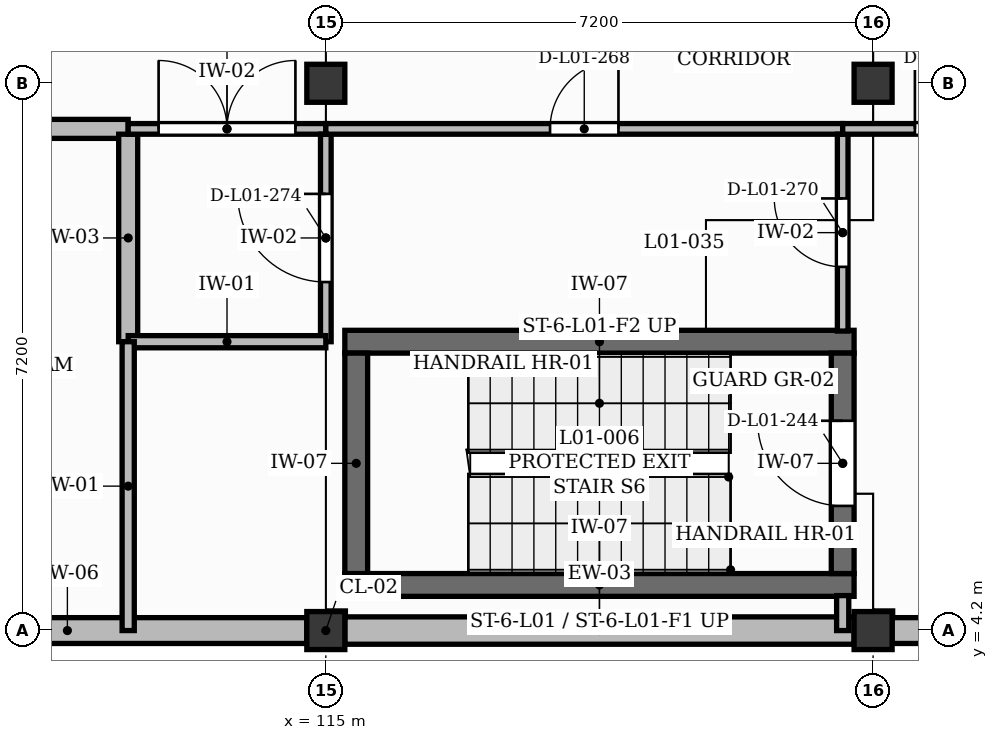
"""IFC4 building model, lengths in metres.
Left out: names, types, materials, properties, quantities, classifications, styles, units other than length and angle.
Written with IfcOpenShell. Run it as: python <this file> out.ifc"""

import sys

from ifc_helpers import new_model, si_unit, direction, frame, frame_2d, origin, origin_2d, place, context, subcontext, project, spatial, rectangle, extrude, element, fill, save


model = new_model("IFC4")
c1 = context("Model", 3, precision=1e-05, world=origin(), true_north=direction((0.0, 1.0)))
c2 = subcontext(c1, "Body", "Model", "MODEL_VIEW")
j1 = project(units=[si_unit("LENGTHUNIT", "METRE"), si_unit("PLANEANGLEUNIT", "RADIAN")], contexts=[c1])
p1 = place(None, origin())
s1 = spatial("IfcSite", under=j1, at=p1, CompositionType="ELEMENT")
p2 = place(p1, origin())
s2 = spatial("IfcBuilding", under=s1, at=p2, CompositionType="ELEMENT")
p3 = place(p2, frame((0.0, 0.0, 4.5)))
s3 = spatial("IfcBuildingStorey", under=s2, at=p3, CompositionType="ELEMENT", Elevation=4.5)
for number, where, z_axis, x_axis in (
    (1, (115.0, 4.2, 0.0), (0.0, 0.0, 1.0), (1.0, 0.0, 0.0)),
    (2, (115.0, 11.4, 0.0), (0.0, 0.0, 1.0), (1.0, 0.0, 0.0)),
    (3, (122.2, 4.2, 0.0), (0.0, 0.0, 1.0), (1.0, 0.0, 0.0)),
    (4, (122.2, 11.4, 0.0), (0.0, 0.0, 1.0), (1.0, 0.0, 0.0)),
):
    element("IfcColumn", number, at=place(p3, frame(where, z_axis=z_axis, x_axis=x_axis)), inside=s3, PredefinedType="COLUMN", context=c2, shape_type="SweptSolid", body=[
        extrude(rectangle(XDim=0.5, YDim=0.5, at=origin_2d()), origin(), (0.0, 0.0, 1.0), 4.22),
    ])
p4 = place(p3, frame((107.96, 4.2, 0.0), z_axis=(0.0, 0.0, 1.0), x_axis=(1.0, 0.0, 0.0)))
e5 = element("IfcWall", 5, at=p4, inside=s3, PredefinedType="SOLIDWALL", context=c2, shape_type="SweptSolid", body=[
    extrude(rectangle(XDim=6.79, YDim=0.34, at=frame_2d((3.395, 0.0))), origin(), (0.0, 0.0, 1.0), 3.76),
])
p5 = place(p4, frame((1.42, 0.0, 1.0)))
e6 = element("IfcOpeningElement", 6, at=p5, cuts=e5, PredefinedType="OPENING", context=c2, shape_type="SweptSolid", body=[
    extrude(rectangle(XDim=1.72, YDim=2.2, at=frame_2d((0.86, 1.1))), frame((0.0, 0.18, 0.0), z_axis=(0.0, -1.0, 0.0), x_axis=(1.0, 0.0, 0.0)), (0.0, 0.0, 1.0), 0.36),
])
p6 = place(p3, frame((115.25, 4.2, 0.0), z_axis=(0.0, 0.0, 1.0), x_axis=(1.0, 0.0, 0.0)))
e7 = element("IfcWall", 7, at=p6, inside=s3, PredefinedType="SOLIDWALL", context=c2, shape_type="SweptSolid", body=[
    extrude(rectangle(XDim=6.7, YDim=0.36, at=frame_2d((3.35, 0.0))), origin(), (0.0, 0.0, 1.0), 3.52),
])
p7 = place(p3, frame((122.45, 4.2, 0.0), z_axis=(0.0, 0.0, 1.0), x_axis=(1.0, 0.0, 0.0)))
e8 = element("IfcWall", 8, at=p7, inside=s3, PredefinedType="SOLIDWALL", context=c2, shape_type="SweptSolid", body=[
    extrude(rectangle(XDim=5.9, YDim=0.34, at=frame_2d((2.95, 0.0))), origin(), (0.0, 0.0, 1.0), 3.52),
])
p8 = place(p7, frame((3.39, 0.0, 1.5)))
e9 = element("IfcOpeningElement", 9, at=p8, cuts=e8, PredefinedType="OPENING", context=c2, shape_type="SweptSolid", body=[
    extrude(rectangle(XDim=1.15, YDim=1.25, at=frame_2d((0.575, 0.625))), frame((0.0, 0.18, 0.0), z_axis=(0.0, -1.0, 0.0), x_axis=(1.0, 0.0, 0.0)), (0.0, 0.0, 1.0), 0.36),
])
for number, where, z_axis, x_axis in (
    (10, (115.25, 4.8, 0.0), (0.0, 0.0, 1.0), (1.0, 0.0, 0.0)),
    (11, (115.25, 8.0, 0.0), (0.0, 0.0, 1.0), (1.0, 0.0, 0.0)),
):
    element("IfcWall", number, at=place(p3, frame(where, z_axis=z_axis, x_axis=x_axis)), inside=s3, PredefinedType="SHEAR", context=c2, shape_type="SweptSolid", body=[
        extrude(rectangle(XDim=6.7, YDim=0.3, at=frame_2d((3.35, 0.0))), origin(), (0.0, 0.0, 1.0), 4.25),
    ])
p9 = place(p3, frame((115.4, 4.95, 0.0), z_axis=(0.0, 0.0, 1.0), x_axis=(0.0, 1.0, 0.0)))
e12 = element("IfcWall", 12, at=p9, inside=s3, PredefinedType="SHEAR", context=c2, shape_type="SweptSolid", body=[
    extrude(rectangle(XDim=2.9, YDim=0.3, at=frame_2d((1.45, 0.0))), origin(), (0.0, 0.0, 1.0), 4.25),
])
p10 = place(p3, frame((121.8, 4.95, 0.0), z_axis=(0.0, 0.0, 1.0), x_axis=(0.0, 1.0, 0.0)))
e13 = element("IfcWall", 13, at=p10, inside=s3, PredefinedType="SHEAR", context=c2, shape_type="SweptSolid", body=[
    extrude(rectangle(XDim=2.9, YDim=0.3, at=frame_2d((1.45, 0.0))), origin(), (0.0, 0.0, 1.0), 4.25),
])
p11 = place(p10, frame((0.89, 0.0, 0.0)))
e14 = element("IfcOpeningElement", 14, at=p11, cuts=e13, PredefinedType="OPENING", context=c2, shape_type="SweptSolid", body=[
    extrude(rectangle(XDim=1.12, YDim=2.1, at=frame_2d((0.56, 1.05))), frame((0.0, 0.16, 0.0), z_axis=(0.0, -1.0, 0.0), x_axis=(1.0, 0.0, 0.0)), (0.0, 0.0, 1.0), 0.32),
])
p12 = place(p3, frame((107.8, 10.8, 0.0), z_axis=(0.0, 0.0, 1.0), x_axis=(1.0, 0.0, 0.0)))
e15 = element("IfcWall", 15, at=p12, inside=s3, PredefinedType="SOLIDWALL", context=c2, shape_type="SweptSolid", body=[
    extrude(rectangle(XDim=4.6, YDim=0.25, at=frame_2d((2.3, 0.0))), origin(), (0.0, 0.0, 1.0), 4.18),
])
p13 = place(p12, frame((1.46, 0.0, 0.0)))
e16 = element("IfcOpeningElement", 16, at=p13, cuts=e15, PredefinedType="OPENING", context=c2, shape_type="SweptSolid", body=[
    extrude(rectangle(XDim=1.68, YDim=2.3, at=frame_2d((0.84, 1.15))), frame((0.0, 0.135, 0.0), z_axis=(0.0, -1.0, 0.0), x_axis=(1.0, 0.0, 0.0)), (0.0, 0.0, 1.0), 0.27),
])
p14 = place(p3, frame((112.4, 8.0, 0.0), z_axis=(0.0, 0.0, 1.0), x_axis=(0.0, 1.0, 0.0)))
e17 = element("IfcWall", 17, at=p14, inside=s3, PredefinedType="SOLIDWALL", context=c2, shape_type="SweptSolid", body=[
    extrude(rectangle(XDim=2.73, YDim=0.25, at=frame_2d((1.365, 0.0))), origin(), (0.0, 0.0, 1.0), 4.18),
])
p15 = place(p3, frame((112.4, 10.8, 0.0), z_axis=(0.0, 0.0, 1.0), x_axis=(1.0, 0.0, 0.0)))
e18 = element("IfcWall", 18, at=p15, inside=s3, PredefinedType="PARTITIONING", context=c2, shape_type="SweptSolid", body=[
    extrude(rectangle(XDim=2.6, YDim=0.14, at=frame_2d((1.3, 0.0))), origin(), (0.0, 0.0, 1.0), 4.18),
])
p16 = place(p15, frame((0.4, 0.0, 0.0)))
e19 = element("IfcOpeningElement", 19, at=p16, cuts=e18, PredefinedType="OPENING", context=c2, shape_type="SweptSolid", body=[
    extrude(rectangle(XDim=1.8, YDim=2.3, at=frame_2d((0.9, 1.15))), frame((0.0, 0.08, 0.0), z_axis=(0.0, -1.0, 0.0), x_axis=(1.0, 0.0, 0.0)), (0.0, 0.0, 1.0), 0.16),
])
p17 = place(p3, frame((115.0, 8.0, 0.0), z_axis=(0.0, 0.0, 1.0), x_axis=(0.0, 1.0, 0.0)))
e20 = element("IfcWall", 20, at=p17, inside=s3, PredefinedType="PARTITIONING", context=c2, shape_type="SweptSolid", body=[
    extrude(rectangle(XDim=2.73, YDim=0.14, at=frame_2d((1.365, 0.0))), origin(), (0.0, 0.0, 1.0), 3.52),
])
p18 = place(p17, frame((0.785, 0.0, 0.0)))
e21 = element("IfcOpeningElement", 21, at=p18, cuts=e20, PredefinedType="OPENING", context=c2, shape_type="SweptSolid", body=[
    extrude(rectangle(XDim=1.16, YDim=2.1, at=frame_2d((0.58, 1.05))), frame((0.0, 0.08, 0.0), z_axis=(0.0, -1.0, 0.0), x_axis=(1.0, 0.0, 0.0)), (0.0, 0.0, 1.0), 0.16),
])
p19 = place(p3, frame((115.0, 10.8, 0.0), z_axis=(0.0, 0.0, 1.0), x_axis=(1.0, 0.0, 0.0)))
e22 = element("IfcWall", 22, at=p19, inside=s3, PredefinedType="PARTITIONING", context=c2, shape_type="SweptSolid", body=[
    extrude(rectangle(XDim=6.8, YDim=0.14, at=frame_2d((3.4, 0.0))), origin(), (0.0, 0.0, 1.0), 4.18),
])
p20 = place(p19, frame((2.95, 0.0, 0.0)))
e23 = element("IfcOpeningElement", 23, at=p20, cuts=e22, PredefinedType="OPENING", context=c2, shape_type="SweptSolid", body=[
    extrude(rectangle(XDim=0.9, YDim=2.1, at=frame_2d((0.45, 1.05))), frame((0.0, 0.08, 0.0), z_axis=(0.0, -1.0, 0.0), x_axis=(1.0, 0.0, 0.0)), (0.0, 0.0, 1.0), 0.16),
])
p21 = place(p3, frame((121.8, 8.14, 0.0), z_axis=(0.0, 0.0, 1.0), x_axis=(0.0, 1.0, 0.0)))
e24 = element("IfcWall", 24, at=p21, inside=s3, PredefinedType="PARTITIONING", context=c2, shape_type="SweptSolid", body=[
    extrude(rectangle(XDim=2.59, YDim=0.14, at=frame_2d((1.295, 0.0))), origin(), (0.0, 0.0, 1.0), 4.18),
])
p22 = place(p21, frame((0.845, 0.0, 0.0)))
e25 = element("IfcOpeningElement", 25, at=p22, cuts=e24, PredefinedType="OPENING", context=c2, shape_type="SweptSolid", body=[
    extrude(rectangle(XDim=0.9, YDim=2.1, at=frame_2d((0.45, 1.05))), frame((0.0, 0.08, 0.0), z_axis=(0.0, -1.0, 0.0), x_axis=(1.0, 0.0, 0.0)), (0.0, 0.0, 1.0), 0.16),
])
p23 = place(p3, frame((121.8, 10.8, 0.0), z_axis=(0.0, 0.0, 1.0), x_axis=(1.0, 0.0, 0.0)))
e26 = element("IfcWall", 26, at=p23, inside=s3, PredefinedType="PARTITIONING", context=c2, shape_type="SweptSolid", body=[
    extrude(rectangle(XDim=2.8, YDim=0.14, at=frame_2d((1.4, 0.0))), origin(), (0.0, 0.0, 1.0), 4.18),
])
p24 = place(p23, frame((0.95, 0.0, 0.0)))
e27 = element("IfcOpeningElement", 27, at=p24, cuts=e26, PredefinedType="OPENING", context=c2, shape_type="SweptSolid", body=[
    extrude(rectangle(XDim=0.9, YDim=2.1, at=frame_2d((0.45, 1.05))), frame((0.0, 0.08, 0.0), z_axis=(0.0, -1.0, 0.0), x_axis=(1.0, 0.0, 0.0)), (0.0, 0.0, 1.0), 0.16),
])
p25 = place(p3, frame((121.8, 4.2, 0.0), z_axis=(0.0, 0.0, 1.0), x_axis=(0.0, 1.0, 0.0)))
e28 = element("IfcWall", 28, at=p25, inside=s3, PredefinedType="PARTITIONING", context=c2, shape_type="SweptSolid", body=[
    extrude(rectangle(XDim=0.46, YDim=0.16, at=frame_2d((0.23, 0.0))), origin(), (0.0, 0.0, 1.0), 4.18),
])
p26 = place(p3, frame((112.4, 8.0, 0.0), z_axis=(0.0, 0.0, 1.0), x_axis=(1.0, 0.0, 0.0)))
e29 = element("IfcWall", 29, at=p26, inside=s3, PredefinedType="PARTITIONING", context=c2, shape_type="SweptSolid", body=[
    extrude(rectangle(XDim=2.6, YDim=0.16, at=frame_2d((1.3, 0.0))), origin(), (0.0, 0.0, 1.0), 4.18),
])
p27 = place(p3, frame((112.4, 4.2, 0.0), z_axis=(0.0, 0.0, 1.0), x_axis=(0.0, 1.0, 0.0)))
e30 = element("IfcWall", 30, at=p27, inside=s3, PredefinedType="PARTITIONING", context=c2, shape_type="SweptSolid", body=[
    extrude(rectangle(XDim=3.8, YDim=0.16, at=frame_2d((1.9, 0.0))), origin(), (0.0, 0.0, 1.0), 4.18),
])
p28 = place(p11, origin())
e31 = element("IfcDoor", 31, at=p28, inside=s3, OperationType="SINGLE_SWING_RIGHT", PredefinedType="DOOR", context=c2, shape_type="SweptSolid", body=[
    extrude(rectangle(XDim=1.12, YDim=2.1, at=frame_2d((0.56, 1.05))), frame((0.0, 0.025, 0.0), z_axis=(0.0, -1.0, 0.0), x_axis=(1.0, 0.0, 0.0)), (0.0, 0.0, 1.0), 0.05),
])
fill(e14, e31)
p29 = place(p24, origin())
e32 = element("IfcDoor", 32, at=p29, inside=s3, OperationType="SINGLE_SWING_LEFT", PredefinedType="DOOR", context=c2, shape_type="SweptSolid", body=[
    extrude(rectangle(XDim=0.9, YDim=2.1, at=frame_2d((0.45, 1.05))), frame((0.0, 0.025, 0.0), z_axis=(0.0, -1.0, 0.0), x_axis=(1.0, 0.0, 0.0)), (0.0, 0.0, 1.0), 0.05),
])
fill(e27, e32)
p30 = place(p16, origin())
e33 = element("IfcDoor", 33, at=p30, inside=s3, OperationType="DOUBLE_DOOR_SINGLE_SWING", PredefinedType="DOOR", context=c2, shape_type="SweptSolid", body=[
    extrude(rectangle(XDim=1.8, YDim=2.3, at=frame_2d((0.9, 1.15))), frame((0.0, 0.025, 0.0), z_axis=(0.0, -1.0, 0.0), x_axis=(1.0, 0.0, 0.0)), (0.0, 0.0, 1.0), 0.05),
])
fill(e19, e33)
p31 = place(p20, origin())
e34 = element("IfcDoor", 34, at=p31, inside=s3, OperationType="SINGLE_SWING_RIGHT", PredefinedType="DOOR", context=c2, shape_type="SweptSolid", body=[
    extrude(rectangle(XDim=0.9, YDim=2.1, at=frame_2d((0.45, 1.05))), frame((0.0, 0.025, 0.0), z_axis=(0.0, -1.0, 0.0), x_axis=(1.0, 0.0, 0.0)), (0.0, 0.0, 1.0), 0.05),
])
fill(e23, e34)
p32 = place(p22, origin())
e35 = element("IfcDoor", 35, at=p32, inside=s3, OperationType="SINGLE_SWING_RIGHT", PredefinedType="DOOR", context=c2, shape_type="SweptSolid", body=[
    extrude(rectangle(XDim=0.9, YDim=2.1, at=frame_2d((0.45, 1.05))), frame((0.0, 0.025, 0.0), z_axis=(0.0, -1.0, 0.0), x_axis=(1.0, 0.0, 0.0)), (0.0, 0.0, 1.0), 0.05),
])
fill(e25, e35)
p33 = place(p18, origin())
e36 = element("IfcDoor", 36, at=p33, inside=s3, OperationType="SINGLE_SWING_RIGHT", PredefinedType="DOOR", context=c2, shape_type="SweptSolid", body=[
    extrude(rectangle(XDim=1.16, YDim=2.1, at=frame_2d((0.58, 1.05))), frame((0.0, 0.025, 0.0), z_axis=(0.0, -1.0, 0.0), x_axis=(1.0, 0.0, 0.0)), (0.0, 0.0, 1.0), 0.05),
])
fill(e21, e36)
save(model, sys.argv[1])
